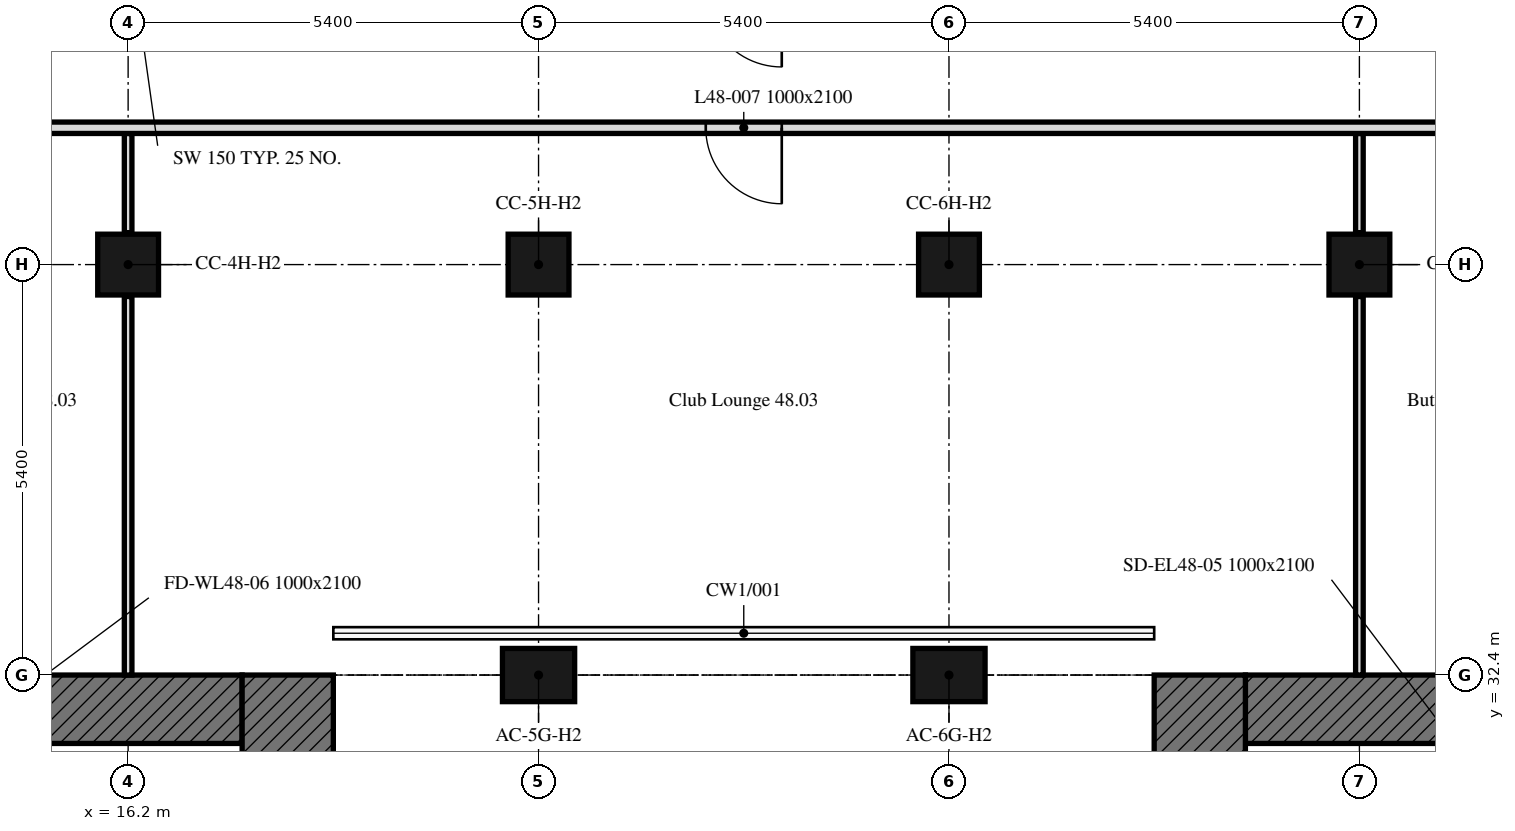
"""IFC4 building model, lengths in metres.
Left out: names, types, materials, properties, quantities, classifications, styles, units other than length and angle.
Written with IfcOpenShell. Run it as: python <this file> out.ifc"""

import sys

from ifc_helpers import new_model, si_unit, direction, frame, frame_2d, origin, origin_2d, place, context, subcontext, project, spatial, rectangle, extrude, element, fill, save


model = new_model("IFC4")
c1 = context("Model", 3, precision=1e-05, world=origin(), true_north=direction((0.0, 1.0)))
c2 = subcontext(c1, "Body", "Model", "MODEL_VIEW")
j1 = project(units=[si_unit("LENGTHUNIT", "METRE"), si_unit("PLANEANGLEUNIT", "RADIAN")], contexts=[c1])
p1 = place(None, origin())
s1 = spatial("IfcSite", under=j1, at=p1, CompositionType="ELEMENT")
p2 = place(p1, origin())
s2 = spatial("IfcBuilding", under=s1, at=p2, CompositionType="ELEMENT")
p3 = place(p2, frame((0.0, 0.0, 197.2)))
s3 = spatial("IfcBuildingStorey", under=s2, at=p3, CompositionType="ELEMENT", Elevation=197.2)
for number, where, z_axis, x_axis in (
    (1, (21.6, 32.4, 0.0), (0.0, 0.0, 1.0), (1.0, 0.0, 0.0)),
    (2, (27.0, 32.4, 0.0), (0.0, 0.0, 1.0), (1.0, 0.0, 0.0)),
):
    element("IfcColumn", number, at=place(p3, frame(where, z_axis=z_axis, x_axis=x_axis)), inside=s3, PredefinedType="COLUMN", context=c2, shape_type="SweptSolid", body=[
        extrude(rectangle(XDim=0.95, YDim=0.7, at=origin_2d()), origin(), (0.0, 0.0, 1.0), 3.0),
    ])
for number, where, z_axis, x_axis in (
    (3, (16.2, 37.8, 0.0), (0.0, 0.0, 1.0), (1.0, 0.0, 0.0)),
    (4, (21.6, 37.8, 0.0), (0.0, 0.0, 1.0), (1.0, 0.0, 0.0)),
    (5, (27.0, 37.8, 0.0), (0.0, 0.0, 1.0), (1.0, 0.0, 0.0)),
    (6, (32.4, 37.8, 0.0), (0.0, 0.0, 1.0), (1.0, 0.0, 0.0)),
):
    element("IfcColumn", number, at=place(p3, frame(where, z_axis=z_axis, x_axis=x_axis)), inside=s3, PredefinedType="COLUMN", context=c2, shape_type="SweptSolid", body=[
        extrude(rectangle(XDim=0.8, YDim=0.8, at=origin_2d()), origin(), (0.0, 0.0, 1.0), 3.0),
    ])
p4 = place(p3, frame((6.6, 31.95, 0.0), z_axis=(0.0, 0.0, 1.0), x_axis=(1.0, 0.0, 0.0)))
e7 = element("IfcWall", 7, at=p4, inside=s3, PredefinedType="SOLIDWALL", context=c2, shape_type="SweptSolid", body=[
    extrude(rectangle(XDim=11.1, YDim=0.9, at=frame_2d((5.55, 0.0))), origin(), (0.0, 0.0, 1.0), 3.0),
])
p5 = place(p4, frame((3.55, 0.0, 0.0)))
e8 = element("IfcOpeningElement", 8, at=p5, cuts=e7, PredefinedType="OPENING", context=c2, shape_type="SweptSolid", body=[
    extrude(rectangle(XDim=2.0, YDim=2.4, at=frame_2d((1.0, 1.2))), frame((0.0, 0.45, 0.0), z_axis=(0.0, -1.0, 0.0), x_axis=(1.0, 0.0, 0.0)), (0.0, 0.0, 1.0), 0.9),
])
p6 = place(p3, frame((18.3, 32.4, 0.0), z_axis=(0.0, 0.0, 1.0), x_axis=(0.0, -1.0, 0.0)))
e9 = element("IfcWall", 9, at=p6, inside=s3, PredefinedType="SOLIDWALL", context=c2, shape_type="SweptSolid", body=[
    extrude(rectangle(XDim=16.2, YDim=1.2, at=frame_2d((8.1, 0.0))), origin(), (0.0, 0.0, 1.0), 3.0),
])
p7 = place(p3, frame((30.9, 31.95, 0.0), z_axis=(0.0, 0.0, 1.0), x_axis=(1.0, 0.0, 0.0)))
e10 = element("IfcWall", 10, at=p7, inside=s3, PredefinedType="SOLIDWALL", context=c2, shape_type="SweptSolid", body=[
    extrude(rectangle(XDim=11.1, YDim=0.9, at=frame_2d((5.55, 0.0))), origin(), (0.0, 0.0, 1.0), 3.0),
])
p8 = place(p7, frame((5.55, 0.0, 0.0)))
e11 = element("IfcOpeningElement", 11, at=p8, cuts=e10, PredefinedType="OPENING", context=c2, shape_type="SweptSolid", body=[
    extrude(rectangle(XDim=2.0, YDim=2.4, at=frame_2d((1.0, 1.2))), frame((0.0, 0.45, 0.0), z_axis=(0.0, -1.0, 0.0), x_axis=(1.0, 0.0, 0.0)), (0.0, 0.0, 1.0), 0.9),
])
p9 = place(p3, frame((30.3, 16.2, 0.0), z_axis=(0.0, 0.0, 1.0), x_axis=(0.0, 1.0, 0.0)))
e12 = element("IfcWall", 12, at=p9, inside=s3, PredefinedType="SOLIDWALL", context=c2, shape_type="SweptSolid", body=[
    extrude(rectangle(XDim=16.2, YDim=1.2, at=frame_2d((8.1, 0.0))), origin(), (0.0, 0.0, 1.0), 3.0),
])
p10 = place(p3, frame((16.2, 39.525, 0.0), z_axis=(0.0, 0.0, 1.0), x_axis=(0.0, -1.0, 0.0)))
e13 = element("IfcWall", 13, at=p10, inside=s3, PredefinedType="PARTITIONING", context=c2, shape_type="SweptSolid", body=[
    extrude(rectangle(XDim=1.305, YDim=0.1, at=frame_2d((0.652, 0.0))), origin(), (0.0, 0.0, 1.0), 2.4),
])
for number, where, z_axis, x_axis in (
    (14, (16.2, 37.38, 0.0), (0.0, 0.0, 1.0), (0.0, -1.0, 0.0)),
    (15, (32.4, 32.4, 0.0), (0.0, 0.0, 1.0), (0.0, 1.0, 0.0)),
):
    element("IfcWall", number, at=place(p3, frame(where, z_axis=z_axis, x_axis=x_axis)), inside=s3, PredefinedType="PARTITIONING", context=c2, shape_type="SweptSolid", body=[
        extrude(rectangle(XDim=4.98, YDim=0.1, at=frame_2d((2.49, 0.0))), origin(), (0.0, 0.0, 1.0), 2.4),
    ])
p11 = place(p3, frame((32.4, 38.22, 0.0), z_axis=(0.0, 0.0, 1.0), x_axis=(0.0, 1.0, 0.0)))
e16 = element("IfcWall", 16, at=p11, inside=s3, PredefinedType="PARTITIONING", context=c2, shape_type="SweptSolid", body=[
    extrude(rectangle(XDim=1.305, YDim=0.1, at=frame_2d((0.652, 0.0))), origin(), (0.0, 0.0, 1.0), 2.4),
])
p12 = place(p3, frame((43.275, 39.6, 0.0), z_axis=(0.0, 0.0, 1.0), x_axis=(-1.0, 0.0, 0.0)))
e17 = element("IfcWall", 17, at=p12, inside=s3, PredefinedType="PARTITIONING", context=c2, shape_type="SweptSolid", body=[
    extrude(rectangle(XDim=36.049, YDim=0.15, at=frame_2d((18.024, 0.0))), origin(), (0.0, 0.0, 1.0), 2.4),
])
p13 = place(p12, frame((18.475, 0.0, 0.0)))
e18 = element("IfcOpeningElement", 18, at=p13, cuts=e17, PredefinedType="OPENING", context=c2, shape_type="SweptSolid", body=[
    extrude(rectangle(XDim=1.0, YDim=2.1, at=frame_2d((0.5, 1.05))), frame((0.0, 0.075, 0.0), z_axis=(0.0, -1.0, 0.0), x_axis=(1.0, 0.0, 0.0)), (0.0, 0.0, 1.0), 0.15),
])
p14 = place(p12, frame((34.799, 0.0, 0.0)))
e19 = element("IfcOpeningElement", 19, at=p14, cuts=e17, PredefinedType="OPENING", context=c2, shape_type="SweptSolid", body=[
    extrude(rectangle(XDim=1.0, YDim=2.1, at=frame_2d((0.5, 1.05))), frame((0.0, 0.075, 0.0), z_axis=(0.0, -1.0, 0.0), x_axis=(1.0, 0.0, 0.0)), (0.0, 0.0, 1.0), 0.15),
])
p15 = place(p12, frame((7.925, 0.0, 0.0)))
e20 = element("IfcOpeningElement", 20, at=p15, cuts=e17, PredefinedType="OPENING", context=c2, shape_type="SweptSolid", body=[
    extrude(rectangle(XDim=1.0, YDim=2.1, at=frame_2d((0.5, 1.05))), frame((0.0, 0.075, 0.0), z_axis=(0.0, -1.0, 0.0), x_axis=(1.0, 0.0, 0.0)), (0.0, 0.0, 1.0), 0.15),
])
p16 = place(p12, frame((29.025, 0.0, 0.0)))
e21 = element("IfcOpeningElement", 21, at=p16, cuts=e17, PredefinedType="OPENING", context=c2, shape_type="SweptSolid", body=[
    extrude(rectangle(XDim=1.0, YDim=2.1, at=frame_2d((0.5, 1.05))), frame((0.0, 0.075, 0.0), z_axis=(0.0, -1.0, 0.0), x_axis=(1.0, 0.0, 0.0)), (0.0, 0.0, 1.0), 0.15),
])
p17 = place(p12, frame((30.495, 0.0, 0.0)))
e22 = element("IfcOpeningElement", 22, at=p17, cuts=e17, PredefinedType="OPENING", context=c2, shape_type="SweptSolid", body=[
    extrude(rectangle(XDim=1.8, YDim=2.4, at=frame_2d((0.9, 1.2))), frame((0.0, 0.075, 0.0), z_axis=(0.0, -1.0, 0.0), x_axis=(1.0, 0.0, 0.0)), (0.0, 0.0, 1.0), 0.15),
])
p18 = place(p12, frame((5.925, 0.0, 0.0)))
e23 = element("IfcOpeningElement", 23, at=p18, cuts=e17, PredefinedType="OPENING", context=c2, shape_type="SweptSolid", body=[
    extrude(rectangle(XDim=1.0, YDim=2.1, at=frame_2d((0.5, 1.05))), frame((0.0, 0.075, 0.0), z_axis=(0.0, -1.0, 0.0), x_axis=(1.0, 0.0, 0.0)), (0.0, 0.0, 1.0), 0.15),
])
p19 = place(p13, origin())
e24 = element("IfcDoor", 24, at=p19, inside=s3, OperationType="SINGLE_SWING_LEFT", PredefinedType="DOOR", context=c2, shape_type="SweptSolid", body=[
    extrude(rectangle(XDim=1.0, YDim=2.1, at=frame_2d((0.5, 1.05))), frame((0.0, 0.025, 0.0), z_axis=(0.0, -1.0, 0.0), x_axis=(1.0, 0.0, 0.0)), (0.0, 0.0, 1.0), 0.05),
])
fill(e18, e24)
save(model, sys.argv[1])
